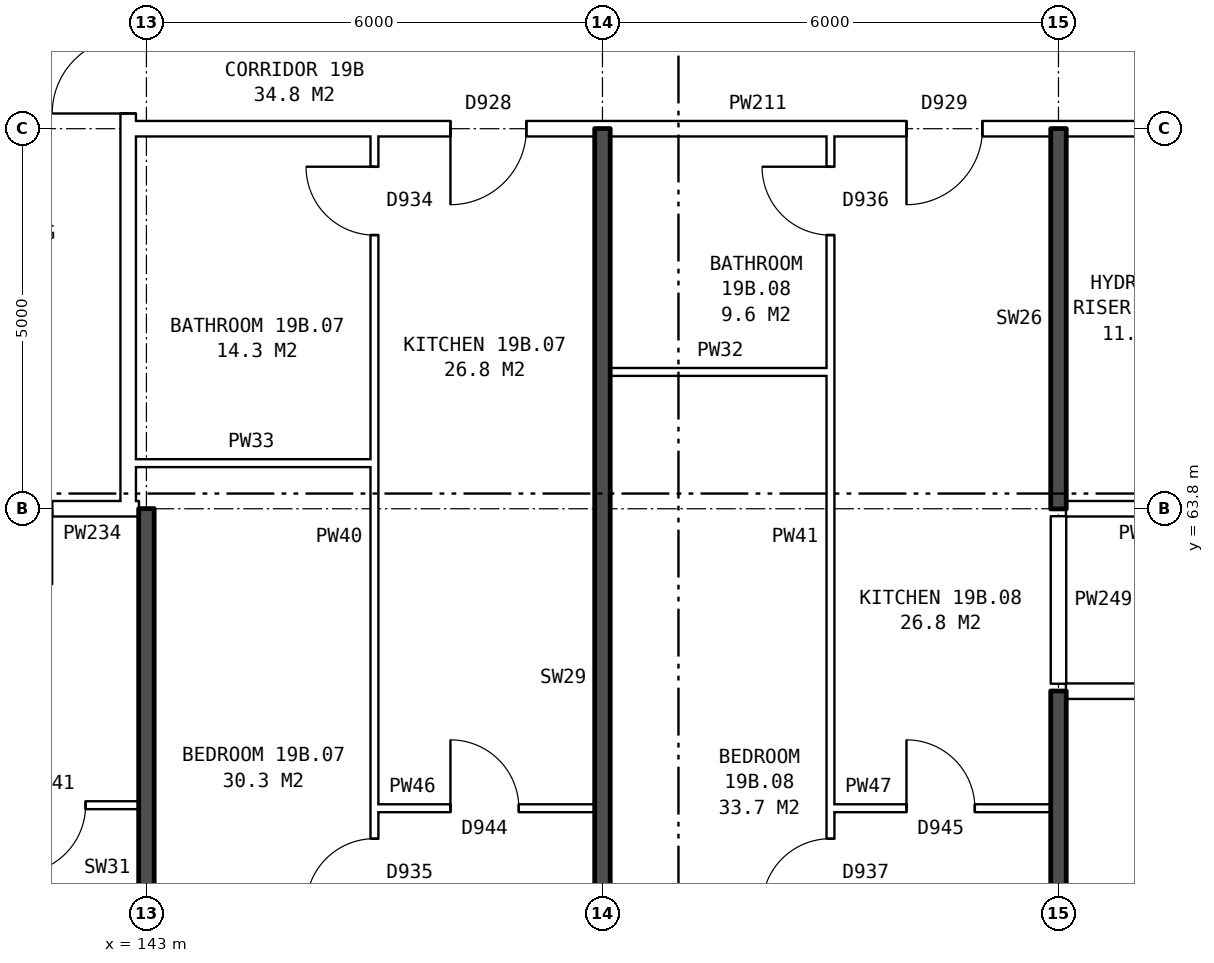
"""IFC4 building model, lengths in metres.
Left out: names, types, materials, properties, quantities, classifications, styles, units other than length and angle.
Written with IfcOpenShell. Run it as: python <this file> out.ifc"""

import sys

from ifc_helpers import new_model, si_unit, direction, frame, frame_2d, origin, place, context, subcontext, project, spatial, rectangle, extrude, element, fill, save


model = new_model("IFC4")
c1 = context("Model", 3, precision=1e-05, world=origin(), true_north=direction((0.0, 1.0)))
c2 = subcontext(c1, "Body", "Model", "MODEL_VIEW")
j1 = project(units=[si_unit("LENGTHUNIT", "METRE"), si_unit("PLANEANGLEUNIT", "RADIAN")], contexts=[c1])
p1 = place(None, origin())
s1 = spatial("IfcSite", under=j1, at=p1, CompositionType="ELEMENT")
p2 = place(p1, origin())
s2 = spatial("IfcBuilding", under=s1, at=p2, CompositionType="ELEMENT")
p3 = place(p2, frame((0.0, 0.0, 71.6)))
s3 = spatial("IfcBuildingStorey", under=s2, at=p3, CompositionType="ELEMENT", Elevation=71.6)
p4 = place(p3, frame((142.76, 63.9, 0.0), z_axis=(0.0, 0.0, 1.0), x_axis=(0.0, 1.0, 0.0)))
e1 = element("IfcWall", 1, at=p4, inside=s3, PredefinedType="PARTITIONING", context=c2, shape_type="SweptSolid", body=[
    extrude(rectangle(XDim=12.2, YDim=0.2, at=frame_2d((6.1, 0.0))), origin(), (0.0, 0.0, 1.0), 2.85),
])
p5 = place(p4, frame((5.1, 0.0, 0.0)))
e2 = element("IfcOpeningElement", 2, at=p5, cuts=e1, PredefinedType="OPENING", context=c2, shape_type="SweptSolid", body=[
    extrude(rectangle(XDim=2.0, YDim=2.1, at=frame_2d((1.0, 1.05))), frame((0.0, 0.11, 0.0), z_axis=(0.0, -1.0, 0.0), x_axis=(1.0, 0.0, 0.0)), (0.0, 0.0, 1.0), 0.22),
])
p6 = place(p3, frame((146.0, 59.86, 0.0), z_axis=(0.0, 0.0, 1.0), x_axis=(1.0, 0.0, 0.0)))
e3 = element("IfcWall", 3, at=p6, inside=s3, PredefinedType="PARTITIONING", context=c2, shape_type="SweptSolid", body=[
    extrude(rectangle(XDim=2.9, YDim=0.1, at=frame_2d((1.45, 0.0))), origin(), (0.0, 0.0, 1.0), 2.85),
])
p7 = place(p6, frame((1.0, 0.0, 0.0)))
e4 = element("IfcOpeningElement", 4, at=p7, cuts=e3, PredefinedType="OPENING", context=c2, shape_type="SweptSolid", body=[
    extrude(rectangle(XDim=0.9, YDim=2.1, at=frame_2d((0.45, 1.05))), frame((0.0, 0.06, 0.0), z_axis=(0.0, -1.0, 0.0), x_axis=(1.0, 0.0, 0.0)), (0.0, 0.0, 1.0), 0.12),
])
p8 = place(p3, frame((152.0, 59.86, 0.0), z_axis=(0.0, 0.0, 1.0), x_axis=(1.0, 0.0, 0.0)))
e5 = element("IfcWall", 5, at=p8, inside=s3, PredefinedType="PARTITIONING", context=c2, shape_type="SweptSolid", body=[
    extrude(rectangle(XDim=2.9, YDim=0.1, at=frame_2d((1.45, 0.0))), origin(), (0.0, 0.0, 1.0), 2.85),
])
p9 = place(p8, frame((1.0, 0.0, 0.0)))
e6 = element("IfcOpeningElement", 6, at=p9, cuts=e5, PredefinedType="OPENING", context=c2, shape_type="SweptSolid", body=[
    extrude(rectangle(XDim=0.9, YDim=2.1, at=frame_2d((0.45, 1.05))), frame((0.0, 0.06, 0.0), z_axis=(0.0, -1.0, 0.0), x_axis=(1.0, 0.0, 0.0)), (0.0, 0.0, 1.0), 0.12),
])
p10 = place(p3, frame((137.1, 59.9, 0.0), z_axis=(0.0, 0.0, 1.0), x_axis=(1.0, 0.0, 0.0)))
e7 = element("IfcWall", 7, at=p10, inside=s3, PredefinedType="PARTITIONING", context=c2, shape_type="SweptSolid", body=[
    extrude(rectangle(XDim=5.8, YDim=0.1, at=frame_2d((2.9, 0.0))), origin(), (0.0, 0.0, 1.0), 2.85),
])
p11 = place(p10, frame((1.3, 0.0, 0.0)))
e8 = element("IfcOpeningElement", 8, at=p11, cuts=e7, PredefinedType="OPENING", context=c2, shape_type="SweptSolid", body=[
    extrude(rectangle(XDim=0.9, YDim=2.1, at=frame_2d((0.45, 1.05))), frame((0.0, 0.06, 0.0), z_axis=(0.0, -1.0, 0.0), x_axis=(1.0, 0.0, 0.0)), (0.0, 0.0, 1.0), 0.12),
])
p12 = place(p10, frame((4.2, 0.0, 0.0)))
e9 = element("IfcOpeningElement", 9, at=p12, cuts=e7, PredefinedType="OPENING", context=c2, shape_type="SweptSolid", body=[
    extrude(rectangle(XDim=0.9, YDim=2.1, at=frame_2d((0.45, 1.05))), frame((0.0, 0.06, 0.0), z_axis=(0.0, -1.0, 0.0), x_axis=(1.0, 0.0, 0.0)), (0.0, 0.0, 1.0), 0.12),
])
p13 = place(p3, frame((155.1, 61.4, 0.0), z_axis=(0.0, 0.0, 1.0), x_axis=(1.0, 0.0, 0.0)))
e10 = element("IfcWall", 10, at=p13, inside=s3, PredefinedType="PARTITIONING", context=c2, shape_type="SweptSolid", body=[
    extrude(rectangle(XDim=19.79, YDim=0.2, at=frame_2d((9.895, 0.0))), origin(), (0.0, 0.0, 1.0), 2.85),
])
p14 = place(p13, frame((1.45, 0.0, 0.0)))
e11 = element("IfcOpeningElement", 11, at=p14, cuts=e10, PredefinedType="OPENING", context=c2, shape_type="SweptSolid", body=[
    extrude(rectangle(XDim=1.0, YDim=2.1, at=frame_2d((0.5, 1.05))), frame((0.0, 0.11, 0.0), z_axis=(0.0, -1.0, 0.0), x_axis=(1.0, 0.0, 0.0)), (0.0, 0.0, 1.0), 0.22),
])
p15 = place(p13, frame((7.4, 0.0, 0.0)))
e12 = element("IfcOpeningElement", 12, at=p15, cuts=e10, PredefinedType="OPENING", context=c2, shape_type="SweptSolid", body=[
    extrude(rectangle(XDim=1.0, YDim=2.1, at=frame_2d((0.5, 1.05))), frame((0.0, 0.11, 0.0), z_axis=(0.0, -1.0, 0.0), x_axis=(1.0, 0.0, 0.0)), (0.0, 0.0, 1.0), 0.22),
])
p16 = place(p13, frame((13.2, 0.0, 0.0)))
e13 = element("IfcOpeningElement", 13, at=p16, cuts=e10, PredefinedType="OPENING", context=c2, shape_type="SweptSolid", body=[
    extrude(rectangle(XDim=1.0, YDim=2.1, at=frame_2d((0.5, 1.05))), frame((0.0, 0.11, 0.0), z_axis=(0.0, -1.0, 0.0), x_axis=(1.0, 0.0, 0.0)), (0.0, 0.0, 1.0), 0.22),
])
p17 = place(p3, frame((139.76, 63.8, 0.0), z_axis=(0.0, 0.0, 1.0), x_axis=(1.0, 0.0, 0.0)))
e14 = element("IfcWall", 14, at=p17, inside=s3, PredefinedType="PARTITIONING", context=c2, shape_type="SweptSolid", body=[
    extrude(rectangle(XDim=3.0, YDim=0.2, at=frame_2d((1.5, 0.0))), origin(), (0.0, 0.0, 1.0), 2.85),
])
p18 = place(p17, frame((1.0, 0.0, 0.0)))
e15 = element("IfcOpeningElement", 15, at=p18, cuts=e14, PredefinedType="OPENING", context=c2, shape_type="SweptSolid", body=[
    extrude(rectangle(XDim=1.0, YDim=2.1, at=frame_2d((0.5, 1.05))), frame((0.0, 0.11, 0.0), z_axis=(0.0, -1.0, 0.0), x_axis=(1.0, 0.0, 0.0)), (0.0, 0.0, 1.0), 0.22),
])
p19 = place(p3, frame((142.76, 63.8, 0.0), z_axis=(0.0, 0.0, 1.0), x_axis=(1.0, 0.0, 0.0)))
e16 = element("IfcWall", 16, at=p19, inside=s3, PredefinedType="PARTITIONING", context=c2, shape_type="SweptSolid", body=[
    extrude(rectangle(XDim=0.14, YDim=0.2, at=frame_2d((0.07, 0.0))), origin(), (0.0, 0.0, 1.0), 2.85),
])
p20 = place(p3, frame((155.1, 63.8, 0.0), z_axis=(0.0, 0.0, 1.0), x_axis=(1.0, 0.0, 0.0)))
e17 = element("IfcWall", 17, at=p20, inside=s3, PredefinedType="PARTITIONING", context=c2, shape_type="SweptSolid", body=[
    extrude(rectangle(XDim=2.14, YDim=0.2, at=frame_2d((1.07, 0.0))), origin(), (0.0, 0.0, 1.0), 2.85),
])
p21 = place(p3, frame((142.76, 64.4, 0.0), z_axis=(0.0, 0.0, 1.0), x_axis=(1.0, 0.0, 0.0)))
e18 = element("IfcWall", 18, at=p21, inside=s3, PredefinedType="PARTITIONING", context=c2, shape_type="SweptSolid", body=[
    extrude(rectangle(XDim=3.24, YDim=0.1, at=frame_2d((1.62, 0.0))), origin(), (0.0, 0.0, 1.0), 2.85),
])
p22 = place(p3, frame((149.1, 65.6, 0.0), z_axis=(0.0, 0.0, 1.0), x_axis=(1.0, 0.0, 0.0)))
e19 = element("IfcWall", 19, at=p22, inside=s3, PredefinedType="PARTITIONING", context=c2, shape_type="SweptSolid", body=[
    extrude(rectangle(XDim=2.9, YDim=0.1, at=frame_2d((1.45, 0.0))), origin(), (0.0, 0.0, 1.0), 2.85),
])
p23 = place(p3, frame((142.76, 68.8, 0.0), z_axis=(0.0, 0.0, 1.0), x_axis=(1.0, 0.0, 0.0)))
e20 = element("IfcWall", 20, at=p23, inside=s3, PredefinedType="PARTITIONING", context=c2, shape_type="SweptSolid", body=[
    extrude(rectangle(XDim=14.48, YDim=0.2, at=frame_2d((7.24, 0.0))), origin(), (0.0, 0.0, 1.0), 2.85),
])
p24 = place(p23, frame((4.24, 0.0, 0.0)))
e21 = element("IfcOpeningElement", 21, at=p24, cuts=e20, PredefinedType="OPENING", context=c2, shape_type="SweptSolid", body=[
    extrude(rectangle(XDim=1.0, YDim=2.1, at=frame_2d((0.5, 1.05))), frame((0.0, 0.11, 0.0), z_axis=(0.0, -1.0, 0.0), x_axis=(1.0, 0.0, 0.0)), (0.0, 0.0, 1.0), 0.22),
])
p25 = place(p23, frame((10.24, 0.0, 0.0)))
e22 = element("IfcOpeningElement", 22, at=p25, cuts=e20, PredefinedType="OPENING", context=c2, shape_type="SweptSolid", body=[
    extrude(rectangle(XDim=1.0, YDim=2.1, at=frame_2d((0.5, 1.05))), frame((0.0, 0.11, 0.0), z_axis=(0.0, -1.0, 0.0), x_axis=(1.0, 0.0, 0.0)), (0.0, 0.0, 1.0), 0.22),
])
p26 = place(p3, frame((143.0, 54.36, 0.0), z_axis=(0.0, 0.0, 1.0), x_axis=(0.0, 1.0, 0.0)))
e23 = element("IfcWall", 23, at=p26, inside=s3, PredefinedType="SOLIDWALL", context=c2, shape_type="SweptSolid", body=[
    extrude(rectangle(XDim=9.44, YDim=0.2, at=frame_2d((4.72, 0.0))), origin(), (0.0, 0.0, 1.0), 2.85),
])
p27 = place(p3, frame((146.0, 54.36, 0.0), z_axis=(0.0, 0.0, 1.0), x_axis=(0.0, 1.0, 0.0)))
e24 = element("IfcWall", 24, at=p27, inside=s3, PredefinedType="PARTITIONING", context=c2, shape_type="SweptSolid", body=[
    extrude(rectangle(XDim=14.34, YDim=0.1, at=frame_2d((7.17, 0.0))), origin(), (0.0, 0.0, 1.0), 2.85),
])
p28 = place(p27, frame((4.2, 0.0, 0.0)))
e25 = element("IfcOpeningElement", 25, at=p28, cuts=e24, PredefinedType="OPENING", context=c2, shape_type="SweptSolid", body=[
    extrude(rectangle(XDim=0.9, YDim=2.1, at=frame_2d((0.45, 1.05))), frame((0.0, 0.06, 0.0), z_axis=(0.0, -1.0, 0.0), x_axis=(1.0, 0.0, 0.0)), (0.0, 0.0, 1.0), 0.12),
])
p29 = place(p27, frame((13.04, 0.0, 0.0)))
e26 = element("IfcOpeningElement", 26, at=p29, cuts=e24, PredefinedType="OPENING", context=c2, shape_type="SweptSolid", body=[
    extrude(rectangle(XDim=0.9, YDim=2.1, at=frame_2d((0.45, 1.05))), frame((0.0, 0.06, 0.0), z_axis=(0.0, -1.0, 0.0), x_axis=(1.0, 0.0, 0.0)), (0.0, 0.0, 1.0), 0.12),
])
p30 = place(p3, frame((149.0, 54.36, 0.0), z_axis=(0.0, 0.0, 1.0), x_axis=(0.0, 1.0, 0.0)))
e27 = element("IfcWall", 27, at=p30, inside=s3, PredefinedType="SOLIDWALL", context=c2, shape_type="SweptSolid", body=[
    extrude(rectangle(XDim=14.44, YDim=0.2, at=frame_2d((7.22, 0.0))), origin(), (0.0, 0.0, 1.0), 2.85),
])
p31 = place(p3, frame((152.0, 54.36, 0.0), z_axis=(0.0, 0.0, 1.0), x_axis=(0.0, 1.0, 0.0)))
e28 = element("IfcWall", 28, at=p31, inside=s3, PredefinedType="PARTITIONING", context=c2, shape_type="SweptSolid", body=[
    extrude(rectangle(XDim=14.34, YDim=0.1, at=frame_2d((7.17, 0.0))), origin(), (0.0, 0.0, 1.0), 2.85),
])
p32 = place(p31, frame((4.2, 0.0, 0.0)))
e29 = element("IfcOpeningElement", 29, at=p32, cuts=e28, PredefinedType="OPENING", context=c2, shape_type="SweptSolid", body=[
    extrude(rectangle(XDim=0.9, YDim=2.1, at=frame_2d((0.45, 1.05))), frame((0.0, 0.06, 0.0), z_axis=(0.0, -1.0, 0.0), x_axis=(1.0, 0.0, 0.0)), (0.0, 0.0, 1.0), 0.12),
])
p33 = place(p31, frame((13.04, 0.0, 0.0)))
e30 = element("IfcOpeningElement", 30, at=p33, cuts=e28, PredefinedType="OPENING", context=c2, shape_type="SweptSolid", body=[
    extrude(rectangle(XDim=0.9, YDim=2.1, at=frame_2d((0.45, 1.05))), frame((0.0, 0.06, 0.0), z_axis=(0.0, -1.0, 0.0), x_axis=(1.0, 0.0, 0.0)), (0.0, 0.0, 1.0), 0.12),
])
p34 = place(p3, frame((155.0, 54.36, 0.0), z_axis=(0.0, 0.0, 1.0), x_axis=(0.0, 1.0, 0.0)))
e31 = element("IfcWall", 31, at=p34, inside=s3, PredefinedType="SOLIDWALL", context=c2, shape_type="SweptSolid", body=[
    extrude(rectangle(XDim=7.04, YDim=0.2, at=frame_2d((3.52, 0.0))), origin(), (0.0, 0.0, 1.0), 2.85),
])
p35 = place(p3, frame((155.0, 61.5, 0.0), z_axis=(0.0, 0.0, 1.0), x_axis=(0.0, 1.0, 0.0)))
e32 = element("IfcWall", 32, at=p35, inside=s3, PredefinedType="PARTITIONING", context=c2, shape_type="SweptSolid", body=[
    extrude(rectangle(XDim=2.2, YDim=0.2, at=frame_2d((1.1, 0.0))), origin(), (0.0, 0.0, 1.0), 2.85),
])
p36 = place(p3, frame((155.0, 63.8, 0.0), z_axis=(0.0, 0.0, 1.0), x_axis=(0.0, 1.0, 0.0)))
e33 = element("IfcWall", 33, at=p36, inside=s3, PredefinedType="SOLIDWALL", context=c2, shape_type="SweptSolid", body=[
    extrude(rectangle(XDim=5.0, YDim=0.2, at=frame_2d((2.5, 0.0))), origin(), (0.0, 0.0, 1.0), 2.85),
])
p37 = place(p5, origin())
e34 = element("IfcDoor", 34, at=p37, inside=s3, OperationType="DOUBLE_DOOR_SINGLE_SWING", PredefinedType="DOOR", context=c2, shape_type="SweptSolid", body=[
    extrude(rectangle(XDim=2.0, YDim=2.1, at=frame_2d((1.0, 1.05))), frame((0.0, 0.025, 0.0), z_axis=(0.0, -1.0, 0.0), x_axis=(1.0, 0.0, 0.0)), (0.0, 0.0, 1.0), 0.05),
])
fill(e2, e34)
p38 = place(p12, frame((0.9, 0.0, 0.0), z_axis=(0.0, 0.0, 1.0), x_axis=(-1.0, 0.0, 0.0)))
e35 = element("IfcDoor", 35, at=p38, inside=s3, OperationType="SINGLE_SWING_RIGHT", PredefinedType="DOOR", context=c2, shape_type="SweptSolid", body=[
    extrude(rectangle(XDim=0.9, YDim=2.1, at=frame_2d((0.45, 1.05))), frame((0.0, 0.025, 0.0), z_axis=(0.0, -1.0, 0.0), x_axis=(1.0, 0.0, 0.0)), (0.0, 0.0, 1.0), 0.05),
])
fill(e9, e35)
p39 = place(p28, origin())
e36 = element("IfcDoor", 36, at=p39, inside=s3, OperationType="SINGLE_SWING_LEFT", PredefinedType="DOOR", context=c2, shape_type="SweptSolid", body=[
    extrude(rectangle(XDim=0.9, YDim=2.1, at=frame_2d((0.45, 1.05))), frame((0.0, 0.025, 0.0), z_axis=(0.0, -1.0, 0.0), x_axis=(1.0, 0.0, 0.0)), (0.0, 0.0, 1.0), 0.05),
])
fill(e25, e36)
p40 = place(p24, frame((1.0, 0.0, 0.0), z_axis=(0.0, 0.0, 1.0), x_axis=(-1.0, 0.0, 0.0)))
e37 = element("IfcDoor", 37, at=p40, inside=s3, OperationType="SINGLE_SWING_RIGHT", PredefinedType="DOOR", context=c2, shape_type="SweptSolid", body=[
    extrude(rectangle(XDim=1.0, YDim=2.1, at=frame_2d((0.5, 1.05))), frame((0.0, 0.025, 0.0), z_axis=(0.0, -1.0, 0.0), x_axis=(1.0, 0.0, 0.0)), (0.0, 0.0, 1.0), 0.05),
])
fill(e21, e37)
p41 = place(p7, origin())
e38 = element("IfcDoor", 38, at=p41, inside=s3, OperationType="SINGLE_SWING_LEFT", PredefinedType="DOOR", context=c2, shape_type="SweptSolid", body=[
    extrude(rectangle(XDim=0.9, YDim=2.1, at=frame_2d((0.45, 1.05))), frame((0.0, 0.025, 0.0), z_axis=(0.0, -1.0, 0.0), x_axis=(1.0, 0.0, 0.0)), (0.0, 0.0, 1.0), 0.05),
])
fill(e4, e38)
p42 = place(p29, origin())
e39 = element("IfcDoor", 39, at=p42, inside=s3, OperationType="SINGLE_SWING_RIGHT", PredefinedType="DOOR", context=c2, shape_type="SweptSolid", body=[
    extrude(rectangle(XDim=0.9, YDim=2.1, at=frame_2d((0.45, 1.05))), frame((0.0, 0.025, 0.0), z_axis=(0.0, -1.0, 0.0), x_axis=(1.0, 0.0, 0.0)), (0.0, 0.0, 1.0), 0.05),
])
fill(e26, e39)
p43 = place(p32, origin())
e40 = element("IfcDoor", 40, at=p43, inside=s3, OperationType="SINGLE_SWING_LEFT", PredefinedType="DOOR", context=c2, shape_type="SweptSolid", body=[
    extrude(rectangle(XDim=0.9, YDim=2.1, at=frame_2d((0.45, 1.05))), frame((0.0, 0.025, 0.0), z_axis=(0.0, -1.0, 0.0), x_axis=(1.0, 0.0, 0.0)), (0.0, 0.0, 1.0), 0.05),
])
fill(e29, e40)
p44 = place(p25, frame((1.0, 0.0, 0.0), z_axis=(0.0, 0.0, 1.0), x_axis=(-1.0, 0.0, 0.0)))
e41 = element("IfcDoor", 41, at=p44, inside=s3, OperationType="SINGLE_SWING_RIGHT", PredefinedType="DOOR", context=c2, shape_type="SweptSolid", body=[
    extrude(rectangle(XDim=1.0, YDim=2.1, at=frame_2d((0.5, 1.05))), frame((0.0, 0.025, 0.0), z_axis=(0.0, -1.0, 0.0), x_axis=(1.0, 0.0, 0.0)), (0.0, 0.0, 1.0), 0.05),
])
fill(e22, e41)
p45 = place(p9, origin())
e42 = element("IfcDoor", 42, at=p45, inside=s3, OperationType="SINGLE_SWING_LEFT", PredefinedType="DOOR", context=c2, shape_type="SweptSolid", body=[
    extrude(rectangle(XDim=0.9, YDim=2.1, at=frame_2d((0.45, 1.05))), frame((0.0, 0.025, 0.0), z_axis=(0.0, -1.0, 0.0), x_axis=(1.0, 0.0, 0.0)), (0.0, 0.0, 1.0), 0.05),
])
fill(e6, e42)
p46 = place(p33, origin())
e43 = element("IfcDoor", 43, at=p46, inside=s3, OperationType="SINGLE_SWING_RIGHT", PredefinedType="DOOR", context=c2, shape_type="SweptSolid", body=[
    extrude(rectangle(XDim=0.9, YDim=2.1, at=frame_2d((0.45, 1.05))), frame((0.0, 0.025, 0.0), z_axis=(0.0, -1.0, 0.0), x_axis=(1.0, 0.0, 0.0)), (0.0, 0.0, 1.0), 0.05),
])
fill(e30, e43)
save(model, sys.argv[1])
